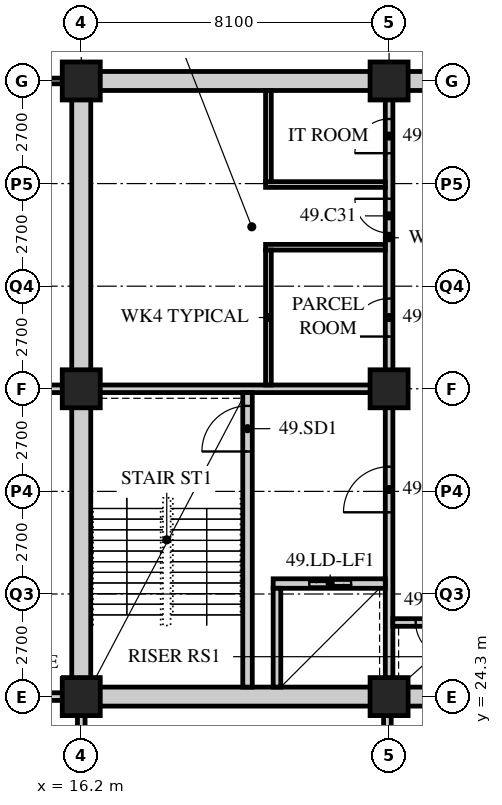
"""IFC4 building model, lengths in metres.
Left out: names, types, materials, properties, quantities, classifications, styles, units other than length and angle.
Written with IfcOpenShell. Run it as: python <this file> out.ifc"""

import sys

from ifc_helpers import new_model, si_unit, direction, frame, frame_2d, origin, origin_2d, place, context, subcontext, project, spatial, rectangle, hollow_rectangle, extrude, element, fill, save


model = new_model("IFC4")
c1 = context("Model", 3, precision=1e-05, world=origin(), true_north=direction((0.0, 1.0)))
c2 = subcontext(c1, "Body", "Model", "MODEL_VIEW")
j1 = project(units=[si_unit("LENGTHUNIT", "METRE"), si_unit("PLANEANGLEUNIT", "RADIAN")], contexts=[c1])
p1 = place(None, origin())
s1 = spatial("IfcSite", under=j1, at=p1, CompositionType="ELEMENT")
p2 = place(p1, origin())
s2 = spatial("IfcBuilding", under=s1, at=p2, CompositionType="ELEMENT")
p3 = place(p2, frame((0.0, 0.0, 192.0)))
s3 = spatial("IfcBuildingStorey", under=s2, at=p3, CompositionType="ELEMENT", Elevation=192.0)
for number, where, z_axis, x_axis in (
    (1, (16.2, 24.3, 0.0), (0.0, 0.0, 1.0), (1.0, 0.0, 0.0)),
    (2, (16.2, 32.4, 0.0), (0.0, 0.0, 1.0), (1.0, 0.0, 0.0)),
    (3, (16.2, 40.5, 0.0), (0.0, 0.0, 1.0), (1.0, 0.0, 0.0)),
    (4, (24.3, 24.3, 0.0), (0.0, 0.0, 1.0), (1.0, 0.0, 0.0)),
    (5, (24.3, 32.4, 0.0), (0.0, 0.0, 1.0), (1.0, 0.0, 0.0)),
    (6, (24.3, 40.5, 0.0), (0.0, 0.0, 1.0), (1.0, 0.0, 0.0)),
):
    element("IfcColumn", number, at=place(p3, frame(where, z_axis=z_axis, x_axis=x_axis)), inside=s3, PredefinedType="COLUMN", context=c2, shape_type="SweptSolid", body=[
        extrude(hollow_rectangle(XDim=1.0, YDim=1.0, WallThickness=0.1, at=origin_2d()), origin(), (0.0, 0.0, 1.0), 3.6),
    ])
p4 = place(p3, frame((16.0, 40.5, 0.0), z_axis=(0.0, 0.0, 1.0), x_axis=(-1.0, 0.0, 0.0)))
e7 = element("IfcWall", 7, at=p4, inside=s3, PredefinedType="PARTITIONING", context=c2, shape_type="SweptSolid", body=[
    extrude(rectangle(XDim=6.1, YDim=0.15, at=frame_2d((3.05, 0.0))), origin(), (0.0, 0.0, 1.0), 3.39),
])
p5 = place(p3, frame((9.9, 32.4, 0.0), z_axis=(0.0, 0.0, 1.0), x_axis=(1.0, 0.0, 0.0)))
e8 = element("IfcWall", 8, at=p5, inside=s3, PredefinedType="SOLIDWALL", context=c2, shape_type="SweptSolid", body=[
    extrude(rectangle(XDim=6.3, YDim=0.2, at=frame_2d((3.15, 0.0))), origin(), (0.0, 0.0, 1.0), 3.39),
])
for number, where, z_axis, x_axis in (
    (9, (16.2, 20.7, 0.0), (0.0, 0.0, 1.0), (0.0, 1.0, 0.0)),
    (10, (24.256, 20.7, 0.0), (0.0, 0.0, 1.0), (0.0, 1.0, 0.0)),
):
    element("IfcWall", number, at=place(p3, frame(where, z_axis=z_axis, x_axis=x_axis)), inside=s3, PredefinedType="SOLIDWALL", context=c2, shape_type="SweptSolid", body=[
        extrude(rectangle(XDim=3.6, YDim=0.2, at=frame_2d((1.8, 0.0))), origin(), (0.0, 0.0, 1.0), 2.778),
    ])
p6 = place(p3, frame((9.9, 24.3, 0.0), z_axis=(0.0, 0.0, 1.0), x_axis=(1.0, 0.0, 0.0)))
e11 = element("IfcWall", 11, at=p6, inside=s3, PredefinedType="SOLIDWALL", context=c2, shape_type="SweptSolid", body=[
    extrude(rectangle(XDim=6.3, YDim=0.2, at=frame_2d((3.15, 0.0))), origin(), (0.0, 0.0, 1.0), 3.39),
])
p7 = place(p3, frame((15.95, 24.3, 0.0), z_axis=(0.0, 0.0, 1.0), x_axis=(1.0, 0.0, 0.0)))
e12 = element("IfcWall", 12, at=p7, inside=s3, PredefinedType="SOLIDWALL", context=c2, shape_type="SweptSolid", body=[
    extrude(rectangle(XDim=24.8, YDim=0.5, at=frame_2d((12.4, 0.0))), origin(), (0.0, 0.0, 1.0), 2.74),
])
p8 = place(p7, frame((11.5, 0.0, 0.0)))
e13 = element("IfcOpeningElement", 13, at=p8, cuts=e12, PredefinedType="OPENING", context=c2, shape_type="SweptSolid", body=[
    extrude(rectangle(XDim=1.8, YDim=2.4, at=frame_2d((0.9, 1.2))), frame((0.0, 0.26, 0.0), z_axis=(0.0, -1.0, 0.0), x_axis=(1.0, 0.0, 0.0)), (0.0, 0.0, 1.0), 0.52),
])
p9 = place(p3, frame((15.95, 40.5, 0.0), z_axis=(0.0, 0.0, 1.0), x_axis=(1.0, 0.0, 0.0)))
e14 = element("IfcWall", 14, at=p9, inside=s3, PredefinedType="SOLIDWALL", context=c2, shape_type="SweptSolid", body=[
    extrude(rectangle(XDim=24.8, YDim=0.5, at=frame_2d((12.4, 0.0))), origin(), (0.0, 0.0, 1.0), 2.74),
])
p10 = place(p9, frame((11.5, 0.0, 0.0)))
e15 = element("IfcOpeningElement", 15, at=p10, cuts=e14, PredefinedType="OPENING", context=c2, shape_type="SweptSolid", body=[
    extrude(rectangle(XDim=1.8, YDim=2.4, at=frame_2d((0.9, 1.2))), frame((0.0, 0.26, 0.0), z_axis=(0.0, -1.0, 0.0), x_axis=(1.0, 0.0, 0.0)), (0.0, 0.0, 1.0), 0.52),
])
p11 = place(p3, frame((16.2, 24.55, 0.0), z_axis=(0.0, 0.0, 1.0), x_axis=(0.0, 1.0, 0.0)))
e16 = element("IfcWall", 16, at=p11, inside=s3, PredefinedType="SOLIDWALL", context=c2, shape_type="SweptSolid", body=[
    extrude(rectangle(XDim=15.7, YDim=0.5, at=frame_2d((7.85, 0.0))), origin(), (0.0, 0.0, 1.0), 2.778),
])
p12 = place(p3, frame((16.45, 32.4, 0.0), z_axis=(0.0, 0.0, 1.0), x_axis=(1.0, 0.0, 0.0)))
e17 = element("IfcWall", 17, at=p12, inside=s3, PredefinedType="SOLIDWALL", context=c2, shape_type="SweptSolid", body=[
    extrude(rectangle(XDim=7.95, YDim=0.2, at=frame_2d((3.975, 0.0))), origin(), (0.0, 0.0, 1.0), 2.778),
])
p13 = place(p3, frame((24.3, 24.55, 0.0), z_axis=(0.0, 0.0, 1.0), x_axis=(0.0, 1.0, 0.0)))
e18 = element("IfcWall", 18, at=p13, inside=s3, PredefinedType="SOLIDWALL", context=c2, shape_type="SweptSolid", body=[
    extrude(rectangle(XDim=7.75, YDim=0.2, at=frame_2d((3.875, 0.0))), origin(), (0.0, 0.0, 1.0), 2.778),
])
p14 = place(p13, frame((4.6, 0.0, 0.0)))
e19 = element("IfcOpeningElement", 19, at=p14, cuts=e18, PredefinedType="OPENING", context=c2, shape_type="SweptSolid", body=[
    extrude(rectangle(XDim=1.2, YDim=2.1, at=frame_2d((0.6, 1.05))), frame((0.0, 0.11, 0.0), z_axis=(0.0, -1.0, 0.0), x_axis=(1.0, 0.0, 0.0)), (0.0, 0.0, 1.0), 0.22),
])
p15 = place(p3, frame((20.575, 24.55, 0.0), z_axis=(0.0, 0.0, 1.0), x_axis=(0.0, 1.0, 0.0)))
e20 = element("IfcWall", 20, at=p15, inside=s3, PredefinedType="SOLIDWALL", context=c2, shape_type="SweptSolid", body=[
    extrude(rectangle(XDim=7.75, YDim=0.25, at=frame_2d((3.875, 0.0))), origin(), (0.0, 0.0, 1.0), 3.39),
])
p16 = place(p15, frame((6.2, 0.0, 0.0)))
e21 = element("IfcOpeningElement", 21, at=p16, cuts=e20, PredefinedType="OPENING", context=c2, shape_type="SweptSolid", body=[
    extrude(rectangle(XDim=1.2, YDim=2.1, at=frame_2d((0.6, 1.05))), frame((0.0, 0.135, 0.0), z_axis=(0.0, -1.0, 0.0), x_axis=(1.0, 0.0, 0.0)), (0.0, 0.0, 1.0), 0.27),
])
p17 = place(p3, frame((21.25, 27.275, 0.0), z_axis=(0.0, 0.0, 1.0), x_axis=(1.0, 0.0, 0.0)))
e22 = element("IfcWall", 22, at=p17, inside=s3, PredefinedType="SOLIDWALL", context=c2, shape_type="SweptSolid", body=[
    extrude(rectangle(XDim=2.95, YDim=0.25, at=frame_2d((1.475, 0.0))), origin(), (0.0, 0.0, 1.0), 3.39),
])
p18 = place(p17, frame((0.95, 0.0, 0.0)))
e23 = element("IfcOpeningElement", 23, at=p18, cuts=e22, PredefinedType="OPENING", context=c2, shape_type="SweptSolid", body=[
    extrude(rectangle(XDim=1.1, YDim=2.4, at=frame_2d((0.55, 1.2))), frame((0.0, 0.135, 0.0), z_axis=(0.0, -1.0, 0.0), x_axis=(1.0, 0.0, 0.0)), (0.0, 0.0, 1.0), 0.27),
])
p19 = place(p3, frame((21.35, 24.55, 0.0), z_axis=(0.0, 0.0, 1.0), x_axis=(0.0, 1.0, 0.0)))
e24 = element("IfcWall", 24, at=p19, inside=s3, PredefinedType="SOLIDWALL", context=c2, shape_type="SweptSolid", body=[
    extrude(rectangle(XDim=2.6, YDim=0.2, at=frame_2d((1.3, 0.0))), origin(), (0.0, 0.0, 1.0), 3.39),
])
p20 = place(p3, frame((24.4, 26.25, 0.0), z_axis=(0.0, 0.0, 1.0), x_axis=(1.0, 0.0, 0.0)))
e25 = element("IfcWall", 25, at=p20, inside=s3, PredefinedType="SOLIDWALL", context=c2, shape_type="SweptSolid", body=[
    extrude(rectangle(XDim=2.15, YDim=0.2, at=frame_2d((1.075, 0.0))), origin(), (0.0, 0.0, 1.0), 3.39),
])
p21 = place(p20, frame((0.6, 0.0, 0.0)))
e26 = element("IfcOpeningElement", 26, at=p21, cuts=e25, PredefinedType="OPENING", context=c2, shape_type="SweptSolid", body=[
    extrude(rectangle(XDim=0.9, YDim=2.1, at=frame_2d((0.45, 1.05))), frame((0.0, 0.11, 0.0), z_axis=(0.0, -1.0, 0.0), x_axis=(1.0, 0.0, 0.0)), (0.0, 0.0, 1.0), 0.22),
])
p22 = place(p3, frame((24.3, 32.5, 0.0), z_axis=(0.0, 0.0, 1.0), x_axis=(0.0, 1.0, 0.0)))
e27 = element("IfcWall", 27, at=p22, inside=s3, PredefinedType="PARTITIONING", context=c2, shape_type="SweptSolid", body=[
    extrude(rectangle(XDim=7.75, YDim=0.2, at=frame_2d((3.875, 0.0))), origin(), (0.0, 0.0, 1.0), 2.778),
])
p23 = place(p22, frame((1.275, 0.0, 0.0)))
e28 = element("IfcOpeningElement", 28, at=p23, cuts=e27, PredefinedType="OPENING", context=c2, shape_type="SweptSolid", body=[
    extrude(rectangle(XDim=1.0, YDim=2.1, at=frame_2d((0.5, 1.05))), frame((0.0, 0.11, 0.0), z_axis=(0.0, -1.0, 0.0), x_axis=(1.0, 0.0, 0.0)), (0.0, 0.0, 1.0), 0.22),
])
p24 = place(p22, frame((4.0, 0.0, 0.0)))
e29 = element("IfcOpeningElement", 29, at=p24, cuts=e27, PredefinedType="OPENING", context=c2, shape_type="SweptSolid", body=[
    extrude(rectangle(XDim=0.9, YDim=2.1, at=frame_2d((0.45, 1.05))), frame((0.0, 0.11, 0.0), z_axis=(0.0, -1.0, 0.0), x_axis=(1.0, 0.0, 0.0)), (0.0, 0.0, 1.0), 0.22),
])
p25 = place(p22, frame((6.1, 0.0, 0.0)))
e30 = element("IfcOpeningElement", 30, at=p25, cuts=e27, PredefinedType="OPENING", context=c2, shape_type="SweptSolid", body=[
    extrude(rectangle(XDim=0.9, YDim=2.1, at=frame_2d((0.45, 1.05))), frame((0.0, 0.11, 0.0), z_axis=(0.0, -1.0, 0.0), x_axis=(1.0, 0.0, 0.0)), (0.0, 0.0, 1.0), 0.22),
])
for number, where, z_axis, x_axis in (
    (31, (21.05, 36.125, 0.0), (0.0, 0.0, 1.0), (1.0, 0.0, 0.0)),
    (32, (21.05, 37.775, 0.0), (0.0, 0.0, 1.0), (1.0, 0.0, 0.0)),
):
    element("IfcWall", number, at=place(p3, frame(where, z_axis=z_axis, x_axis=x_axis)), inside=s3, PredefinedType="PARTITIONING", context=c2, shape_type="SweptSolid", body=[
        extrude(rectangle(XDim=3.15, YDim=0.15, at=frame_2d((1.575, 0.0))), origin(), (0.0, 0.0, 1.0), 3.39),
    ])
p26 = place(p3, frame((21.125, 32.5, 0.0), z_axis=(0.0, 0.0, 1.0), x_axis=(0.0, 1.0, 0.0)))
e33 = element("IfcWall", 33, at=p26, inside=s3, PredefinedType="PARTITIONING", context=c2, shape_type="SweptSolid", body=[
    extrude(rectangle(XDim=3.55, YDim=0.15, at=frame_2d((1.775, 0.0))), origin(), (0.0, 0.0, 1.0), 3.39),
])
p27 = place(p3, frame((21.125, 37.85, 0.0), z_axis=(0.0, 0.0, 1.0), x_axis=(0.0, 1.0, 0.0)))
e34 = element("IfcWall", 34, at=p27, inside=s3, PredefinedType="PARTITIONING", context=c2, shape_type="SweptSolid", body=[
    extrude(rectangle(XDim=2.4, YDim=0.15, at=frame_2d((1.2, 0.0))), origin(), (0.0, 0.0, 1.0), 3.39),
])
p28 = place(p23, origin())
e35 = element("IfcDoor", 35, at=p28, inside=s3, OperationType="SINGLE_SWING_LEFT", PredefinedType="DOOR", context=c2, shape_type="SweptSolid", body=[
    extrude(rectangle(XDim=1.0, YDim=2.1, at=frame_2d((0.5, 1.05))), frame((0.0, 0.025, 0.0), z_axis=(0.0, -1.0, 0.0), x_axis=(1.0, 0.0, 0.0)), (0.0, 0.0, 1.0), 0.05),
])
fill(e28, e35)
p29 = place(p24, origin())
e36 = element("IfcDoor", 36, at=p29, inside=s3, OperationType="SINGLE_SWING_RIGHT", PredefinedType="DOOR", context=c2, shape_type="SweptSolid", body=[
    extrude(rectangle(XDim=0.9, YDim=2.1, at=frame_2d((0.45, 1.05))), frame((0.0, 0.025, 0.0), z_axis=(0.0, -1.0, 0.0), x_axis=(1.0, 0.0, 0.0)), (0.0, 0.0, 1.0), 0.05),
])
fill(e29, e36)
p30 = place(p25, origin())
e37 = element("IfcDoor", 37, at=p30, inside=s3, OperationType="SINGLE_SWING_LEFT", PredefinedType="DOOR", context=c2, shape_type="SweptSolid", body=[
    extrude(rectangle(XDim=0.9, YDim=2.1, at=frame_2d((0.45, 1.05))), frame((0.0, 0.025, 0.0), z_axis=(0.0, -1.0, 0.0), x_axis=(1.0, 0.0, 0.0)), (0.0, 0.0, 1.0), 0.05),
])
fill(e30, e37)
p31 = place(p16, origin())
e38 = element("IfcDoor", 38, at=p31, inside=s3, OperationType="SINGLE_SWING_LEFT", PredefinedType="DOOR", context=c2, shape_type="SweptSolid", body=[
    extrude(rectangle(XDim=1.2, YDim=2.1, at=frame_2d((0.6, 1.05))), frame((0.0, 0.025, 0.0), z_axis=(0.0, -1.0, 0.0), x_axis=(1.0, 0.0, 0.0)), (0.0, 0.0, 1.0), 0.05),
])
fill(e21, e38)
p32 = place(p14, origin())
e39 = element("IfcDoor", 39, at=p32, inside=s3, OperationType="SINGLE_SWING_LEFT", PredefinedType="DOOR", context=c2, shape_type="SweptSolid", body=[
    extrude(rectangle(XDim=1.2, YDim=2.1, at=frame_2d((0.6, 1.05))), frame((0.0, 0.025, 0.0), z_axis=(0.0, -1.0, 0.0), x_axis=(1.0, 0.0, 0.0)), (0.0, 0.0, 1.0), 0.05),
])
fill(e19, e39)
p33 = place(p21, origin())
e40 = element("IfcDoor", 40, at=p33, inside=s3, OperationType="SINGLE_SWING_LEFT", PredefinedType="DOOR", context=c2, shape_type="SweptSolid", body=[
    extrude(rectangle(XDim=0.9, YDim=2.1, at=frame_2d((0.45, 1.05))), frame((0.0, 0.025, 0.0), z_axis=(0.0, -1.0, 0.0), x_axis=(1.0, 0.0, 0.0)), (0.0, 0.0, 1.0), 0.05),
])
fill(e26, e40)
p34 = place(p18, origin())
e41 = element("IfcDoor", 41, at=p34, inside=s3, OperationType="DOUBLE_DOOR_SLIDING", PredefinedType="DOOR", context=c2, shape_type="SweptSolid", body=[
    extrude(rectangle(XDim=1.1, YDim=2.4, at=frame_2d((0.55, 1.2))), frame((0.0, 0.025, 0.0), z_axis=(0.0, -1.0, 0.0), x_axis=(1.0, 0.0, 0.0)), (0.0, 0.0, 1.0), 0.05),
])
fill(e23, e41)
save(model, sys.argv[1])
